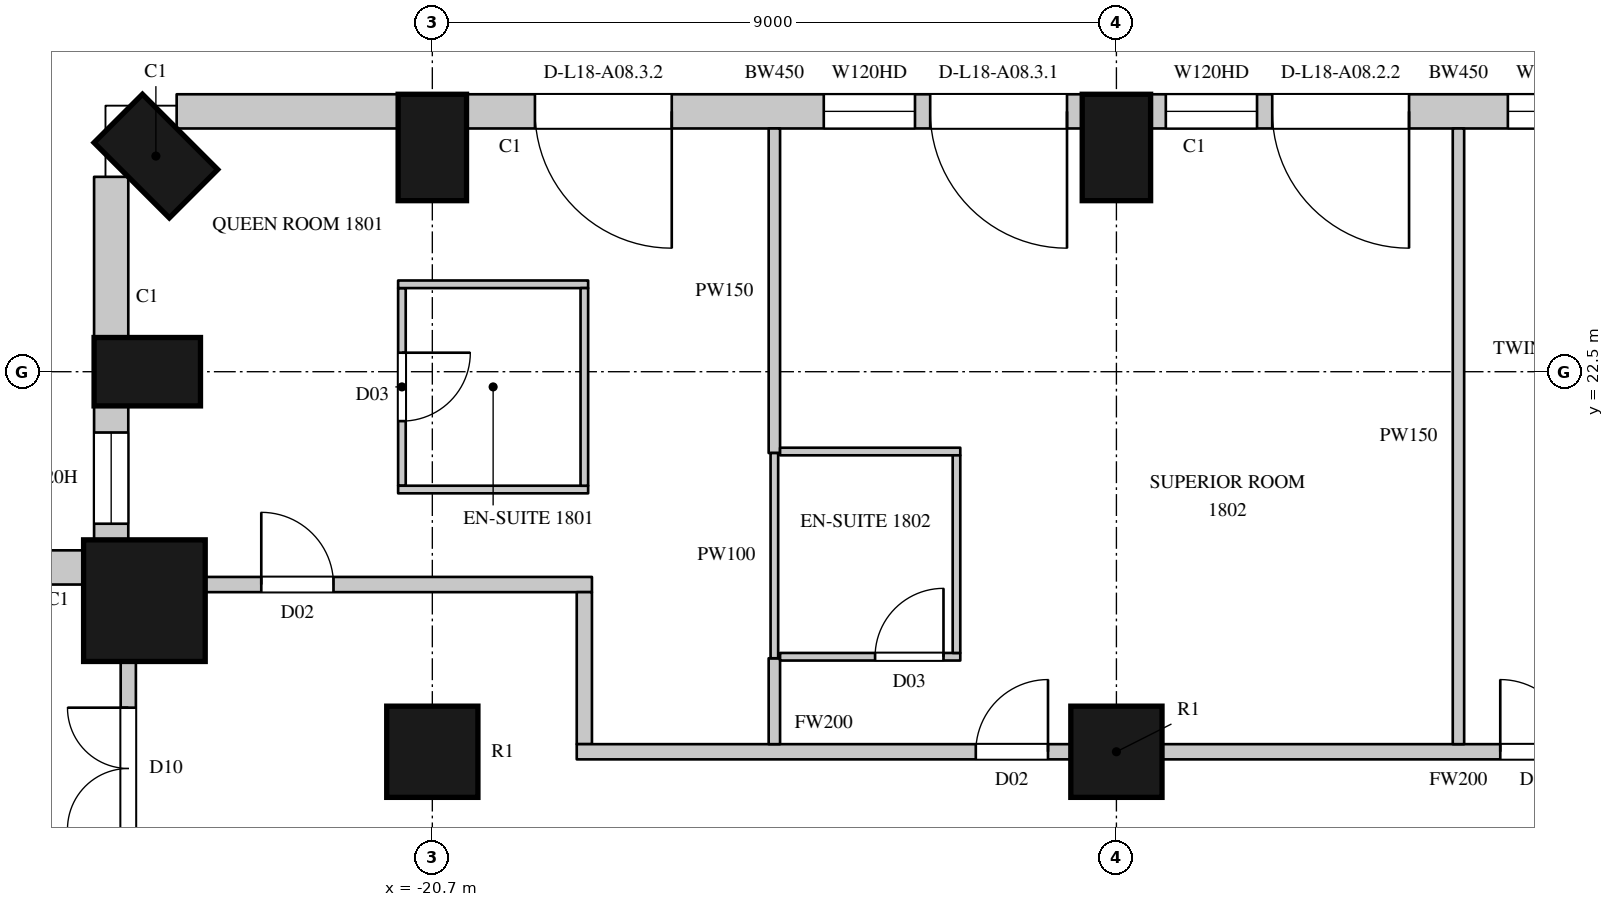
"""IFC4 building model, lengths in metres.
Left out: names, types, materials, properties, quantities, classifications, styles, units other than length and angle.
Written with IfcOpenShell. Run it as: python <this file> out.ifc"""

import sys

from ifc_helpers import new_model, si_unit, direction, frame, frame_2d, origin, origin_2d, place, context, subcontext, project, spatial, rectangle, circle, extrude, element, fill, save


model = new_model("IFC4")
c1 = context("Model", 3, precision=1e-05, world=origin(), true_north=direction((0.0, 1.0)))
c2 = subcontext(c1, "Body", "Model", "MODEL_VIEW")
j1 = project(units=[si_unit("LENGTHUNIT", "METRE"), si_unit("PLANEANGLEUNIT", "RADIAN")], contexts=[c1])
p1 = place(None, origin())
s1 = spatial("IfcSite", under=j1, at=p1, CompositionType="ELEMENT")
p2 = place(p1, origin())
s2 = spatial("IfcBuilding", under=s1, at=p2, CompositionType="ELEMENT")
p3 = place(p2, frame((0.0, 0.0, 95.1)))
s3 = spatial("IfcBuildingStorey", under=s2, at=p3, CompositionType="ELEMENT", Elevation=95.1)
for number, where, z_axis, x_axis in (
    (1, (-11.7, 25.45, 0.0), (0.0, 0.0, 1.0), (-1.0, 0.0, 0.0)),
    (2, (-20.7, 25.45, 0.0), (0.0, 0.0, 1.0), (-1.0, 0.0, 0.0)),
    (3, (-24.337, 25.337, 0.0), (0.0, 0.0, 1.0), (-0.707, -0.707, 0.0)),
    (4, (-24.45, 22.5, 0.0), (0.0, 0.0, 1.0), (0.0, -1.0, 0.0)),
):
    element("IfcColumn", number, at=place(p3, frame(where, z_axis=z_axis, x_axis=x_axis)), inside=s3, PredefinedType="COLUMN", context=c2, shape_type="SweptSolid", body=[
        extrude(rectangle(XDim=0.9, YDim=1.4, at=origin_2d()), origin(), (0.0, 0.0, 1.0), 3.6),
    ])
p4 = place(p3, frame((-24.488, 19.488, 0.0), z_axis=(0.0, 0.0, 1.0), x_axis=(1.0, 0.0, 0.0)))
e5 = element("IfcColumn", 5, at=p4, inside=s3, PredefinedType="COLUMN", context=c2, shape_type="SweptSolid", body=[
    extrude(circle(Radius=0.8, at=origin_2d()), origin(), (0.0, 0.0, 1.0), 3.6),
])
for number, where, z_axis, x_axis in (
    (6, (-20.7, 17.5, 0.0), (0.0, 0.0, 1.0), (1.0, 0.0, 0.0)),
    (7, (-11.7, 17.5, 0.0), (0.0, 0.0, 1.0), (1.0, 0.0, 0.0)),
):
    element("IfcColumn", number, at=place(p3, frame(where, z_axis=z_axis, x_axis=x_axis)), inside=s3, PredefinedType="COLUMN", context=c2, shape_type="SweptSolid", body=[
        extrude(circle(Radius=0.6, at=origin_2d()), origin(), (0.0, 0.0, 1.0), 3.6),
    ])
p5 = place(p3, frame((-3.15, 25.925, 0.0), z_axis=(0.0, 0.0, 1.0), x_axis=(-1.0, 0.0, 0.0)))
e8 = element("IfcWall", 8, at=p5, inside=s3, PredefinedType="SOLIDWALL", context=c2, shape_type="SweptSolid", body=[
    extrude(rectangle(XDim=8.1, YDim=0.45, at=frame_2d((4.05, 0.0))), origin(), (0.0, 0.0, 1.0), 3.3),
])
p6 = place(p5, frame((0.2, 0.0, 0.0)))
e9 = element("IfcOpeningElement", 9, at=p6, cuts=e8, PredefinedType="OPENING", context=c2, shape_type="SweptSolid", body=[
    extrude(rectangle(XDim=1.8, YDim=2.4, at=frame_2d((0.9, 1.2))), frame((0.0, 0.235, 0.0), z_axis=(0.0, -1.0, 0.0), x_axis=(1.0, 0.0, 0.0)), (0.0, 0.0, 1.0), 0.47),
])
p7 = place(p5, frame((2.2, 0.0, 1.05)))
e10 = element("IfcOpeningElement", 10, at=p7, cuts=e8, PredefinedType="OPENING", context=c2, shape_type="SweptSolid", body=[
    extrude(rectangle(XDim=1.2, YDim=2.0, at=frame_2d((0.6, 1.0))), frame((0.0, 0.235, 0.0), z_axis=(0.0, -1.0, 0.0), x_axis=(1.0, 0.0, 0.0)), (0.0, 0.0, 1.0), 0.47),
])
p8 = place(p5, frame((4.7, 0.0, 0.0)))
e11 = element("IfcOpeningElement", 11, at=p8, cuts=e8, PredefinedType="OPENING", context=c2, shape_type="SweptSolid", body=[
    extrude(rectangle(XDim=1.8, YDim=2.4, at=frame_2d((0.9, 1.2))), frame((0.0, 0.235, 0.0), z_axis=(0.0, -1.0, 0.0), x_axis=(1.0, 0.0, 0.0)), (0.0, 0.0, 1.0), 0.47),
])
p9 = place(p5, frame((6.7, 0.0, 1.05)))
e12 = element("IfcOpeningElement", 12, at=p9, cuts=e8, PredefinedType="OPENING", context=c2, shape_type="SweptSolid", body=[
    extrude(rectangle(XDim=1.2, YDim=2.0, at=frame_2d((0.6, 1.0))), frame((0.0, 0.235, 0.0), z_axis=(0.0, -1.0, 0.0), x_axis=(1.0, 0.0, 0.0)), (0.0, 0.0, 1.0), 0.47),
])
p10 = place(p3, frame((-12.15, 25.925, 0.0), z_axis=(0.0, 0.0, 1.0), x_axis=(-1.0, 0.0, 0.0)))
e13 = element("IfcWall", 13, at=p10, inside=s3, PredefinedType="SOLIDWALL", context=c2, shape_type="SweptSolid", body=[
    extrude(rectangle(XDim=8.1, YDim=0.45, at=frame_2d((4.05, 0.0))), origin(), (0.0, 0.0, 1.0), 3.3),
])
p11 = place(p10, frame((0.2, 0.0, 0.0)))
e14 = element("IfcOpeningElement", 14, at=p11, cuts=e13, PredefinedType="OPENING", context=c2, shape_type="SweptSolid", body=[
    extrude(rectangle(XDim=1.8, YDim=2.4, at=frame_2d((0.9, 1.2))), frame((0.0, 0.235, 0.0), z_axis=(0.0, -1.0, 0.0), x_axis=(1.0, 0.0, 0.0)), (0.0, 0.0, 1.0), 0.47),
])
p12 = place(p10, frame((2.2, 0.0, 1.05)))
e15 = element("IfcOpeningElement", 15, at=p12, cuts=e13, PredefinedType="OPENING", context=c2, shape_type="SweptSolid", body=[
    extrude(rectangle(XDim=1.2, YDim=2.0, at=frame_2d((0.6, 1.0))), frame((0.0, 0.235, 0.0), z_axis=(0.0, -1.0, 0.0), x_axis=(1.0, 0.0, 0.0)), (0.0, 0.0, 1.0), 0.47),
])
p13 = place(p10, frame((5.4, 0.0, 0.0)))
e16 = element("IfcOpeningElement", 16, at=p13, cuts=e13, PredefinedType="OPENING", context=c2, shape_type="SweptSolid", body=[
    extrude(rectangle(XDim=1.8, YDim=2.4, at=frame_2d((0.9, 1.2))), frame((0.0, 0.235, 0.0), z_axis=(0.0, -1.0, 0.0), x_axis=(1.0, 0.0, 0.0)), (0.0, 0.0, 1.0), 0.47),
])
p14 = place(p3, frame((-21.15, 25.925, 0.0), z_axis=(0.0, 0.0, 1.0), x_axis=(-1.0, 0.0, 0.0)))
e17 = element("IfcWall", 17, at=p14, inside=s3, PredefinedType="SOLIDWALL", context=c2, shape_type="SweptSolid", body=[
    extrude(rectangle(XDim=2.914, YDim=0.45, at=frame_2d((1.457, 0.0))), origin(), (0.0, 0.0, 1.0), 3.3),
])
p15 = place(p3, frame((-24.925, 25.064, 0.0), z_axis=(0.0, 0.0, 1.0), x_axis=(0.0, -1.0, 0.0)))
e18 = element("IfcWall", 18, at=p15, inside=s3, PredefinedType="SOLIDWALL", context=c2, shape_type="SweptSolid", body=[
    extrude(rectangle(XDim=2.114, YDim=0.45, at=frame_2d((1.057, 0.0))), origin(), (0.0, 0.0, 1.0), 3.3),
])
p16 = place(p3, frame((-24.925, 22.05, 0.0), z_axis=(0.0, 0.0, 1.0), x_axis=(0.0, -1.0, 0.0)))
e19 = element("IfcWall", 19, at=p16, inside=s3, PredefinedType="SOLIDWALL", context=c2, shape_type="SweptSolid", body=[
    extrude(rectangle(XDim=1.792, YDim=0.45, at=frame_2d((0.896, 0.0))), origin(), (0.0, 0.0, 1.0), 3.3),
])
p17 = place(p16, frame((0.35, 0.0, 1.05)))
e20 = element("IfcOpeningElement", 20, at=p17, cuts=e19, PredefinedType="OPENING", context=c2, shape_type="SweptSolid", body=[
    extrude(rectangle(XDim=1.2, YDim=2.0, at=frame_2d((0.6, 1.0))), frame((0.0, 0.235, 0.0), z_axis=(0.0, -1.0, 0.0), x_axis=(1.0, 0.0, 0.0)), (0.0, 0.0, 1.0), 0.47),
])
p18 = place(p3, frame((-25.259, 19.925, 0.0), z_axis=(0.0, 0.0, 1.0), x_axis=(-1.0, 0.0, 0.0)))
e21 = element("IfcWall", 21, at=p18, inside=s3, PredefinedType="SOLIDWALL", context=c2, shape_type="SweptSolid", body=[
    extrude(rectangle(XDim=3.805, YDim=0.45, at=frame_2d((1.903, 0.0))), origin(), (0.0, 0.0, 1.0), 3.3),
])
p19 = place(p18, frame((0.592, 0.0, 1.05)))
e22 = element("IfcOpeningElement", 22, at=p19, cuts=e21, PredefinedType="OPENING", context=c2, shape_type="SweptSolid", body=[
    extrude(rectangle(XDim=2.7, YDim=2.0, at=frame_2d((1.35, 1.0))), frame((0.0, 0.235, 0.0), z_axis=(0.0, -1.0, 0.0), x_axis=(1.0, 0.0, 0.0)), (0.0, 0.0, 1.0), 0.47),
])
p20 = place(p3, frame((-24.7, 16.03, 0.0), z_axis=(0.0, 0.0, 1.0), x_axis=(0.0, 1.0, 0.0)))
e23 = element("IfcWall", 23, at=p20, inside=s3, PredefinedType="PARTITIONING", context=c2, shape_type="SweptSolid", body=[
    extrude(rectangle(XDim=2.67, YDim=0.2, at=frame_2d((1.335, 0.0))), origin(), (0.0, 0.0, 1.0), 3.3),
])
p21 = place(p20, frame((0.45, 0.0, 0.0)))
e24 = element("IfcOpeningElement", 24, at=p21, cuts=e23, PredefinedType="OPENING", context=c2, shape_type="SweptSolid", body=[
    extrude(rectangle(XDim=1.6, YDim=2.4, at=frame_2d((0.8, 1.2))), frame((0.0, 0.11, 0.0), z_axis=(0.0, -1.0, 0.0), x_axis=(1.0, 0.0, 0.0)), (0.0, 0.0, 1.0), 0.22),
])
p22 = place(p3, frame((-23.7, 19.7, 0.0), z_axis=(0.0, 0.0, 1.0), x_axis=(1.0, 0.0, 0.0)))
e25 = element("IfcWall", 25, at=p22, inside=s3, PredefinedType="PARTITIONING", context=c2, shape_type="SweptSolid", body=[
    extrude(rectangle(XDim=5.1, YDim=0.2, at=frame_2d((2.55, 0.0))), origin(), (0.0, 0.0, 1.0), 3.3),
])
p23 = place(p22, frame((0.75, 0.0, 0.0)))
e26 = element("IfcOpeningElement", 26, at=p23, cuts=e25, PredefinedType="OPENING", context=c2, shape_type="SweptSolid", body=[
    extrude(rectangle(XDim=0.95, YDim=2.2, at=frame_2d((0.475, 1.1))), frame((0.0, 0.11, 0.0), z_axis=(0.0, -1.0, 0.0), x_axis=(1.0, 0.0, 0.0)), (0.0, 0.0, 1.0), 0.22),
])
p24 = place(p3, frame((-18.7, 17.6, 0.0), z_axis=(0.0, 0.0, 1.0), x_axis=(0.0, 1.0, 0.0)))
e27 = element("IfcWall", 27, at=p24, inside=s3, PredefinedType="PARTITIONING", context=c2, shape_type="SweptSolid", body=[
    extrude(rectangle(XDim=2.0, YDim=0.2, at=frame_2d((1.0, 0.0))), origin(), (0.0, 0.0, 1.0), 3.3),
])
p25 = place(p3, frame((-18.8, 17.5, 0.0), z_axis=(0.0, 0.0, 1.0), x_axis=(1.0, 0.0, 0.0)))
e28 = element("IfcWall", 28, at=p25, inside=s3, PredefinedType="PARTITIONING", context=c2, shape_type="SweptSolid", body=[
    extrude(rectangle(XDim=6.5, YDim=0.2, at=frame_2d((3.25, 0.0))), origin(), (0.0, 0.0, 1.0), 2.75),
])
p26 = place(p25, frame((5.25, 0.0, 0.0)))
e29 = element("IfcOpeningElement", 29, at=p26, cuts=e28, PredefinedType="OPENING", context=c2, shape_type="SweptSolid", body=[
    extrude(rectangle(XDim=0.95, YDim=2.2, at=frame_2d((0.475, 1.1))), frame((0.0, 0.11, 0.0), z_axis=(0.0, -1.0, 0.0), x_axis=(1.0, 0.0, 0.0)), (0.0, 0.0, 1.0), 0.22),
])
p27 = place(p3, frame((-11.1, 17.5, 0.0), z_axis=(0.0, 0.0, 1.0), x_axis=(1.0, 0.0, 0.0)))
e30 = element("IfcWall", 30, at=p27, inside=s3, PredefinedType="PARTITIONING", context=c2, shape_type="SweptSolid", body=[
    extrude(rectangle(XDim=7.8, YDim=0.2, at=frame_2d((3.9, 0.0))), origin(), (0.0, 0.0, 1.0), 2.75),
])
p28 = place(p27, frame((4.45, 0.0, 0.0)))
e31 = element("IfcOpeningElement", 31, at=p28, cuts=e30, PredefinedType="OPENING", context=c2, shape_type="SweptSolid", body=[
    extrude(rectangle(XDim=0.95, YDim=2.2, at=frame_2d((0.475, 1.1))), frame((0.0, 0.11, 0.0), z_axis=(0.0, -1.0, 0.0), x_axis=(1.0, 0.0, 0.0)), (0.0, 0.0, 1.0), 0.22),
])
p29 = place(p3, frame((-16.2, 17.6, 0.0), z_axis=(0.0, 0.0, 1.0), x_axis=(0.0, 1.0, 0.0)))
e32 = element("IfcWall", 32, at=p29, inside=s3, PredefinedType="PARTITIONING", context=c2, shape_type="SweptSolid", body=[
    extrude(rectangle(XDim=1.13, YDim=0.15, at=frame_2d((0.565, 0.0))), origin(), (0.0, 0.0, 1.0), 2.65),
])
p30 = place(p3, frame((-16.2, 21.43, 0.0), z_axis=(0.0, 0.0, 1.0), x_axis=(0.0, 1.0, 0.0)))
e33 = element("IfcWall", 33, at=p30, inside=s3, PredefinedType="PARTITIONING", context=c2, shape_type="SweptSolid", body=[
    extrude(rectangle(XDim=4.27, YDim=0.15, at=frame_2d((2.135, 0.0))), origin(), (0.0, 0.0, 1.0), 2.65),
])
p31 = place(p3, frame((-7.2, 17.6, 0.0), z_axis=(0.0, 0.0, 1.0), x_axis=(0.0, 1.0, 0.0)))
e34 = element("IfcWall", 34, at=p31, inside=s3, PredefinedType="PARTITIONING", context=c2, shape_type="SweptSolid", body=[
    extrude(rectangle(XDim=8.1, YDim=0.15, at=frame_2d((4.05, 0.0))), origin(), (0.0, 0.0, 1.0), 2.65),
])
p32 = place(p3, frame((-21.1, 21.0, 0.0), z_axis=(0.0, 0.0, 1.0), x_axis=(0.0, 1.0, 0.0)))
e35 = element("IfcWall", 35, at=p32, inside=s3, PredefinedType="PARTITIONING", context=c2, shape_type="SweptSolid", body=[
    extrude(rectangle(XDim=2.6, YDim=0.1, at=frame_2d((1.3, 0.0))), origin(), (0.0, 0.0, 1.0), 3.3),
])
p33 = place(p32, frame((0.85, 0.0, 0.0)))
e36 = element("IfcOpeningElement", 36, at=p33, cuts=e35, PredefinedType="OPENING", context=c2, shape_type="SweptSolid", body=[
    extrude(rectangle(XDim=0.9, YDim=2.2, at=frame_2d((0.45, 1.1))), frame((0.0, 0.06, 0.0), z_axis=(0.0, -1.0, 0.0), x_axis=(1.0, 0.0, 0.0)), (0.0, 0.0, 1.0), 0.12),
])
for number, where, z_axis, x_axis in (
    (37, (-21.15, 20.95, 0.0), (0.0, 0.0, 1.0), (1.0, 0.0, 0.0)),
    (38, (-21.15, 23.65, 0.0), (0.0, 0.0, 1.0), (1.0, 0.0, 0.0)),
):
    element("IfcWall", number, at=place(p3, frame(where, z_axis=z_axis, x_axis=x_axis)), inside=s3, PredefinedType="PARTITIONING", context=c2, shape_type="SweptSolid", body=[
        extrude(rectangle(XDim=2.5, YDim=0.1, at=frame_2d((1.25, 0.0))), origin(), (0.0, 0.0, 1.0), 3.3),
    ])
p34 = place(p3, frame((-18.7, 21.0, 0.0), z_axis=(0.0, 0.0, 1.0), x_axis=(0.0, 1.0, 0.0)))
e39 = element("IfcWall", 39, at=p34, inside=s3, PredefinedType="PARTITIONING", context=c2, shape_type="SweptSolid", body=[
    extrude(rectangle(XDim=2.6, YDim=0.1, at=frame_2d((1.3, 0.0))), origin(), (0.0, 0.0, 1.0), 3.3),
])
p35 = place(p3, frame((-16.2, 18.73, 0.0), z_axis=(0.0, 0.0, 1.0), x_axis=(0.0, 1.0, 0.0)))
e40 = element("IfcWall", 40, at=p35, inside=s3, PredefinedType="PARTITIONING", context=c2, shape_type="SweptSolid", body=[
    extrude(rectangle(XDim=2.7, YDim=0.1, at=frame_2d((1.35, 0.0))), origin(), (0.0, 0.0, 1.0), 2.65),
])
p36 = place(p3, frame((-16.125, 18.75, 0.0), z_axis=(0.0, 0.0, 1.0), x_axis=(1.0, 0.0, 0.0)))
e41 = element("IfcWall", 41, at=p36, inside=s3, PredefinedType="PARTITIONING", context=c2, shape_type="SweptSolid", body=[
    extrude(rectangle(XDim=2.371, YDim=0.1, at=frame_2d((1.186, 0.0))), origin(), (0.0, 0.0, 1.0), 3.3),
])
p37 = place(p36, frame((1.25, 0.0, 0.0)))
e42 = element("IfcOpeningElement", 42, at=p37, cuts=e41, PredefinedType="OPENING", context=c2, shape_type="SweptSolid", body=[
    extrude(rectangle(XDim=0.9, YDim=2.2, at=frame_2d((0.45, 1.1))), frame((0.0, 0.06, 0.0), z_axis=(0.0, -1.0, 0.0), x_axis=(1.0, 0.0, 0.0)), (0.0, 0.0, 1.0), 0.12),
])
p38 = place(p3, frame((-16.125, 21.45, 0.0), z_axis=(0.0, 0.0, 1.0), x_axis=(1.0, 0.0, 0.0)))
e43 = element("IfcWall", 43, at=p38, inside=s3, PredefinedType="PARTITIONING", context=c2, shape_type="SweptSolid", body=[
    extrude(rectangle(XDim=2.371, YDim=0.1, at=frame_2d((1.186, 0.0))), origin(), (0.0, 0.0, 1.0), 3.3),
])
p39 = place(p3, frame((-13.804, 18.8, 0.0), z_axis=(0.0, 0.0, 1.0), x_axis=(0.0, 1.0, 0.0)))
e44 = element("IfcWall", 44, at=p39, inside=s3, PredefinedType="PARTITIONING", context=c2, shape_type="SweptSolid", body=[
    extrude(rectangle(XDim=2.6, YDim=0.1, at=frame_2d((1.3, 0.0))), origin(), (0.0, 0.0, 1.0), 3.3),
])
p40 = place(p7, origin())
e45 = element("IfcWindow", 45, at=p40, inside=s3, PartitioningType="SINGLE_PANEL", PredefinedType="WINDOW", context=c2, shape_type="SweptSolid", body=[
    extrude(rectangle(XDim=1.2, YDim=2.0, at=frame_2d((0.6, 1.0))), frame((0.0, 0.135, 0.0), z_axis=(0.0, -1.0, 0.0), x_axis=(1.0, 0.0, 0.0)), (0.0, 0.0, 1.0), 0.06),
])
fill(e10, e45)
p41 = place(p8, origin())
e46 = element("IfcDoor", 46, at=p41, inside=s3, OperationType="SLIDING_TO_LEFT", PredefinedType="DOOR", context=c2, shape_type="SweptSolid", body=[
    extrude(rectangle(XDim=1.8, YDim=2.4, at=frame_2d((0.9, 1.2))), frame((0.0, 0.13, 0.0), z_axis=(0.0, -1.0, 0.0), x_axis=(1.0, 0.0, 0.0)), (0.0, 0.0, 1.0), 0.05),
])
fill(e11, e46)
p42 = place(p9, origin())
e47 = element("IfcWindow", 47, at=p42, inside=s3, PartitioningType="SINGLE_PANEL", PredefinedType="WINDOW", context=c2, shape_type="SweptSolid", body=[
    extrude(rectangle(XDim=1.2, YDim=2.0, at=frame_2d((0.6, 1.0))), frame((0.0, 0.135, 0.0), z_axis=(0.0, -1.0, 0.0), x_axis=(1.0, 0.0, 0.0)), (0.0, 0.0, 1.0), 0.06),
])
fill(e12, e47)
p43 = place(p11, origin())
e48 = element("IfcDoor", 48, at=p43, inside=s3, OperationType="SLIDING_TO_LEFT", PredefinedType="DOOR", context=c2, shape_type="SweptSolid", body=[
    extrude(rectangle(XDim=1.8, YDim=2.4, at=frame_2d((0.9, 1.2))), frame((0.0, 0.13, 0.0), z_axis=(0.0, -1.0, 0.0), x_axis=(1.0, 0.0, 0.0)), (0.0, 0.0, 1.0), 0.05),
])
fill(e14, e48)
p44 = place(p12, origin())
e49 = element("IfcWindow", 49, at=p44, inside=s3, PartitioningType="SINGLE_PANEL", PredefinedType="WINDOW", context=c2, shape_type="SweptSolid", body=[
    extrude(rectangle(XDim=1.2, YDim=2.0, at=frame_2d((0.6, 1.0))), frame((0.0, 0.135, 0.0), z_axis=(0.0, -1.0, 0.0), x_axis=(1.0, 0.0, 0.0)), (0.0, 0.0, 1.0), 0.06),
])
fill(e15, e49)
p45 = place(p13, origin())
e50 = element("IfcDoor", 50, at=p45, inside=s3, OperationType="SLIDING_TO_LEFT", PredefinedType="DOOR", context=c2, shape_type="SweptSolid", body=[
    extrude(rectangle(XDim=1.8, YDim=2.4, at=frame_2d((0.9, 1.2))), frame((0.0, 0.13, 0.0), z_axis=(0.0, -1.0, 0.0), x_axis=(1.0, 0.0, 0.0)), (0.0, 0.0, 1.0), 0.05),
])
fill(e16, e50)
p46 = place(p17, origin())
e51 = element("IfcWindow", 51, at=p46, inside=s3, PartitioningType="SINGLE_PANEL", PredefinedType="WINDOW", context=c2, shape_type="SweptSolid", body=[
    extrude(rectangle(XDim=1.2, YDim=2.0, at=frame_2d((0.6, 1.0))), frame((0.0, 0.135, 0.0), z_axis=(0.0, -1.0, 0.0), x_axis=(1.0, 0.0, 0.0)), (0.0, 0.0, 1.0), 0.06),
])
fill(e20, e51)
p47 = place(p21, origin())
e52 = element("IfcDoor", 52, at=p47, inside=s3, OperationType="DOUBLE_DOOR_SINGLE_SWING", PredefinedType="DOOR", context=c2, shape_type="SweptSolid", body=[
    extrude(rectangle(XDim=1.6, YDim=2.4, at=frame_2d((0.8, 1.2))), frame((0.0, 0.025, 0.0), z_axis=(0.0, -1.0, 0.0), x_axis=(1.0, 0.0, 0.0)), (0.0, 0.0, 1.0), 0.05),
])
fill(e24, e52)
p48 = place(p23, origin())
e53 = element("IfcDoor", 53, at=p48, inside=s3, OperationType="SINGLE_SWING_LEFT", PredefinedType="DOOR", context=c2, shape_type="SweptSolid", body=[
    extrude(rectangle(XDim=0.95, YDim=2.2, at=frame_2d((0.475, 1.1))), frame((0.0, 0.025, 0.0), z_axis=(0.0, -1.0, 0.0), x_axis=(1.0, 0.0, 0.0)), (0.0, 0.0, 1.0), 0.05),
])
fill(e26, e53)
p49 = place(p33, origin())
e54 = element("IfcDoor", 54, at=p49, inside=s3, OperationType="SINGLE_SWING_LEFT", PredefinedType="DOOR", context=c2, shape_type="SweptSolid", body=[
    extrude(rectangle(XDim=0.9, YDim=2.2, at=frame_2d((0.45, 1.1))), frame((0.0, 0.025, 0.0), z_axis=(0.0, -1.0, 0.0), x_axis=(1.0, 0.0, 0.0)), (0.0, 0.0, 1.0), 0.05),
])
fill(e36, e54)
p50 = place(p26, origin())
e55 = element("IfcDoor", 55, at=p50, inside=s3, OperationType="SINGLE_SWING_RIGHT", PredefinedType="DOOR", context=c2, shape_type="SweptSolid", body=[
    extrude(rectangle(XDim=0.95, YDim=2.2, at=frame_2d((0.475, 1.1))), frame((0.0, 0.025, 0.0), z_axis=(0.0, -1.0, 0.0), x_axis=(1.0, 0.0, 0.0)), (0.0, 0.0, 1.0), 0.05),
])
fill(e29, e55)
p51 = place(p37, origin())
e56 = element("IfcDoor", 56, at=p51, inside=s3, OperationType="SINGLE_SWING_RIGHT", PredefinedType="DOOR", context=c2, shape_type="SweptSolid", body=[
    extrude(rectangle(XDim=0.9, YDim=2.2, at=frame_2d((0.45, 1.1))), frame((0.0, 0.025, 0.0), z_axis=(0.0, -1.0, 0.0), x_axis=(1.0, 0.0, 0.0)), (0.0, 0.0, 1.0), 0.05),
])
fill(e42, e56)
p52 = place(p28, origin())
e57 = element("IfcDoor", 57, at=p52, inside=s3, OperationType="SINGLE_SWING_LEFT", PredefinedType="DOOR", context=c2, shape_type="SweptSolid", body=[
    extrude(rectangle(XDim=0.95, YDim=2.2, at=frame_2d((0.475, 1.1))), frame((0.0, 0.025, 0.0), z_axis=(0.0, -1.0, 0.0), x_axis=(1.0, 0.0, 0.0)), (0.0, 0.0, 1.0), 0.05),
])
fill(e31, e57)
save(model, sys.argv[1])
